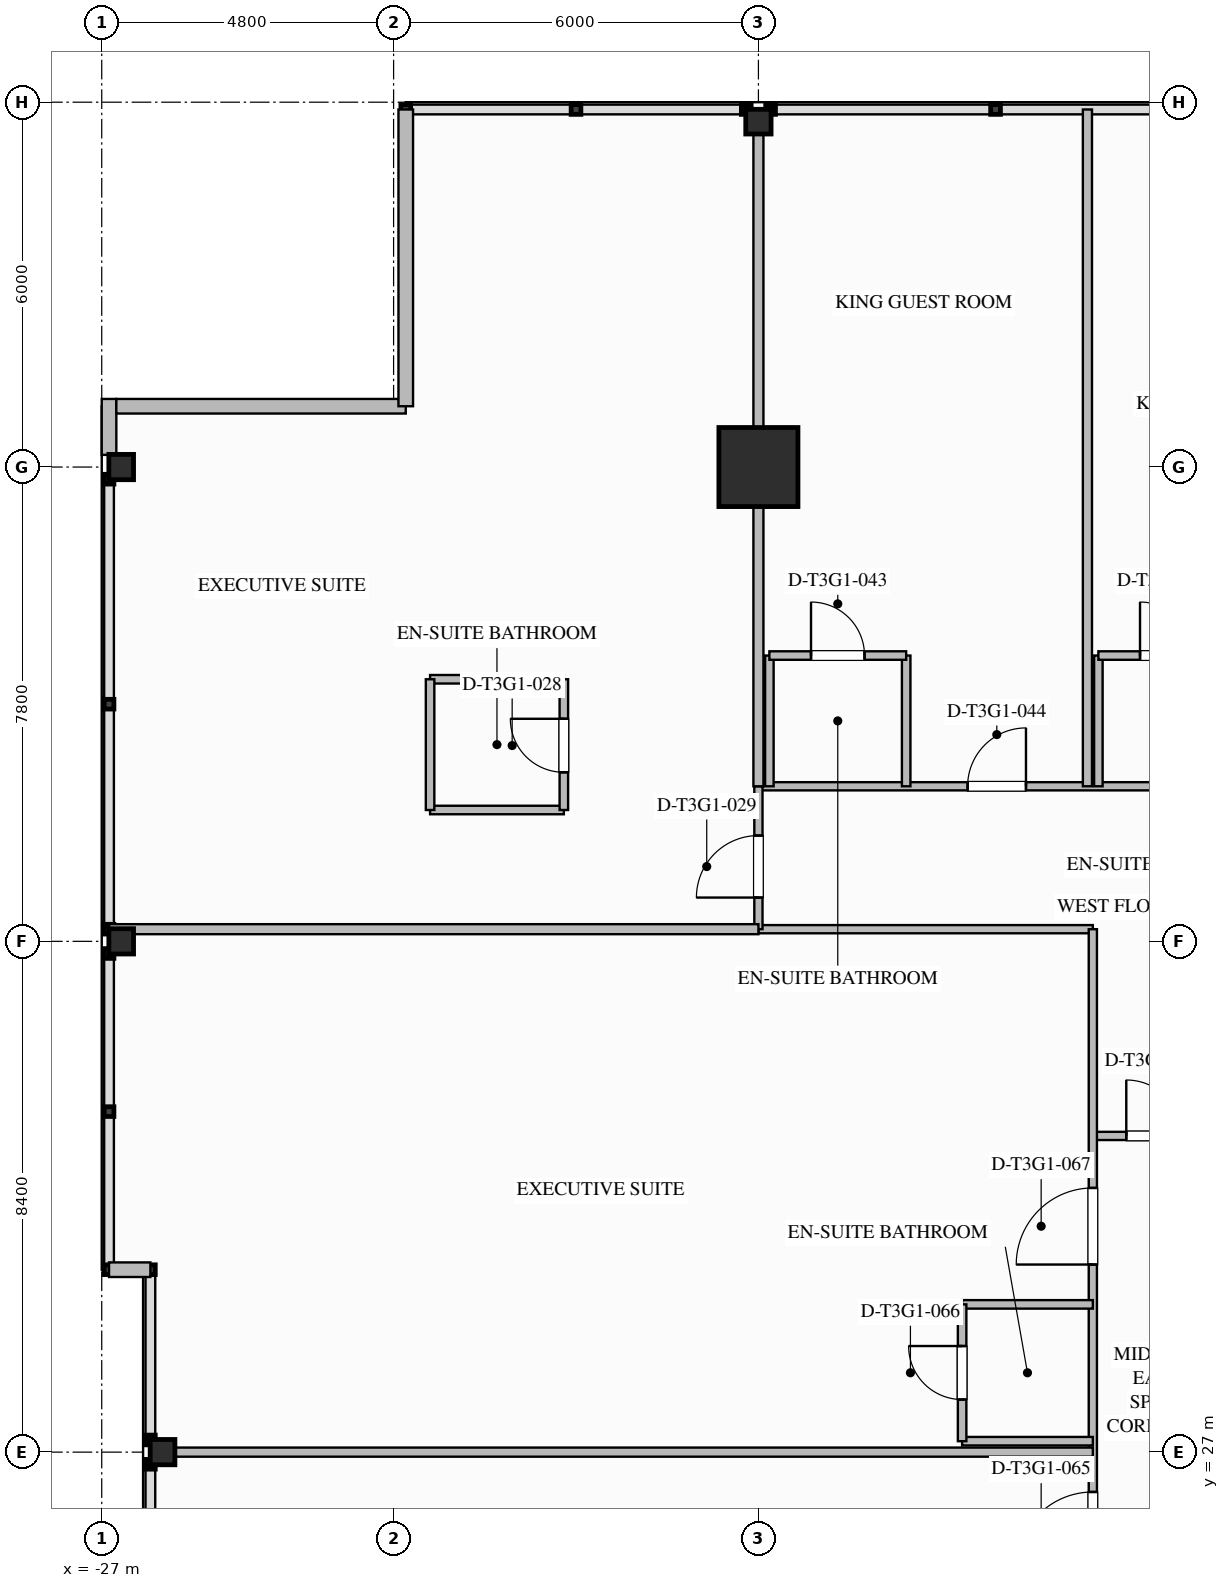
"""IFC4 building model, lengths in metres.
Left out: names, types, materials, properties, quantities, classifications, styles, units other than length and angle.
Written with IfcOpenShell. Run it as: python <this file> out.ifc"""

import sys

from ifc_helpers import new_model, si_unit, direction, frame, frame_2d, origin, origin_2d, place, context, subcontext, project, spatial, rectangle, i_section, extrude, element, fill, save


model = new_model("IFC4")
c1 = context("Model", 3, precision=1e-05, world=origin(), true_north=direction((0.0, 1.0)))
c2 = subcontext(c1, "Body", "Model", "MODEL_VIEW")
j1 = project(units=[si_unit("LENGTHUNIT", "METRE"), si_unit("PLANEANGLEUNIT", "RADIAN")], contexts=[c1])
p1 = place(None, origin())
s1 = spatial("IfcSite", under=j1, at=p1, CompositionType="ELEMENT")
p2 = place(p1, origin())
s2 = spatial("IfcBuilding", under=s1, at=p2, CompositionType="ELEMENT")
p3 = place(p2, frame((0.0, 0.0, 150.4)))
s3 = spatial("IfcBuildingStorey", under=s2, at=p3, CompositionType="ELEMENT", Elevation=150.4)
p4 = place(p3, frame((-16.2, 43.2, 0.0), z_axis=(0.0, 0.0, 1.0), x_axis=(1.0, 0.0, 0.0)))
e1 = element("IfcColumn", 1, at=p4, inside=s3, PredefinedType="COLUMN", context=c2, shape_type="SweptSolid", body=[
    extrude(rectangle(XDim=1.3, YDim=1.3, at=origin_2d()), origin(), (0.0, 0.0, 1.0), 3.55),
])
for number, where, z_axis, x_axis in (
    (2, (-26.0, 27.0, 0.0), (0.0, 0.0, 1.0), (1.0, 0.0, 0.0)),
    (3, (-26.68, 35.4, 0.0), (0.0, 0.0, 1.0), (1.0, 0.0, 0.0)),
    (4, (-26.68, 43.2, 0.0), (0.0, 0.0, 1.0), (1.0, 0.0, 0.0)),
    (5, (-16.2, 48.88, 0.0), (0.0, 0.0, 1.0), (0.0, 1.0, 0.0)),
):
    element("IfcColumn", number, at=place(p3, frame(where, z_axis=z_axis, x_axis=x_axis)), inside=s3, PredefinedType="COLUMN", context=c2, shape_type="SweptSolid", body=[
        extrude(i_section(OverallWidth=0.406, OverallDepth=0.416, WebThickness=0.03, FlangeThickness=0.048, FilletRadius=0.028, at=origin_2d()), origin(), (0.0, 0.0, 1.0), 3.547),
    ])
p5 = place(p3, frame((-26.88, 43.4, 0.0), z_axis=(0.0, 0.0, 1.0), x_axis=(0.0, 1.0, 0.0)))
e6 = element("IfcWall", 6, at=p5, inside=s3, PredefinedType="STANDARD", context=c2, shape_type="SweptSolid", body=[
    extrude(rectangle(XDim=0.92, YDim=0.24, at=frame_2d((0.46, 0.0))), origin(), (0.0, 0.0, 1.0), 3.29),
])
p6 = place(p3, frame((-26.76, 44.2, 0.0), z_axis=(0.0, 0.0, 1.0), x_axis=(1.0, 0.0, 0.0)))
e7 = element("IfcWall", 7, at=p6, inside=s3, PredefinedType="STANDARD", context=c2, shape_type="SweptSolid", body=[
    extrude(rectangle(XDim=4.76, YDim=0.24, at=frame_2d((2.38, 0.0))), origin(), (0.0, 0.0, 1.0), 3.29),
])
p7 = place(p3, frame((-22.0, 44.2, 0.0), z_axis=(0.0, 0.0, 1.0), x_axis=(0.0, 1.0, 0.0)))
e8 = element("IfcWall", 8, at=p7, inside=s3, PredefinedType="STANDARD", context=c2, shape_type="SweptSolid", body=[
    extrude(rectangle(XDim=4.88, YDim=0.24, at=frame_2d((2.44, 0.0))), origin(), (0.0, 0.0, 1.0), 3.29),
])
p8 = place(p3, frame((-26.2, 30.0, 0.0), z_axis=(0.0, 0.0, 1.0), x_axis=(-1.0, 0.0, 0.0)))
e9 = element("IfcWall", 9, at=p8, inside=s3, PredefinedType="STANDARD", context=c2, shape_type="SweptSolid", body=[
    extrude(rectangle(XDim=0.68, YDim=0.24, at=frame_2d((0.34, 0.0))), origin(), (0.0, 0.0, 1.0), 3.29),
])
p9 = place(p3, frame((-10.7, 32.2, 0.0), z_axis=(0.0, 0.0, 1.0), x_axis=(1.0, 0.0, 0.0)))
e10 = element("IfcWall", 10, at=p9, inside=s3, PredefinedType="PARTITIONING", context=c2, shape_type="SweptSolid", body=[
    extrude(rectangle(XDim=2.1, YDim=0.135, at=frame_2d((1.05, 0.0))), origin(), (0.0, 0.0, 1.0), 3.29),
])
p10 = place(p9, frame((0.55, 0.0, 0.0)))
e11 = element("IfcOpeningElement", 11, at=p10, cuts=e10, PredefinedType="OPENING", context=c2, shape_type="SweptSolid", body=[
    extrude(rectangle(XDim=0.92, YDim=2.1, at=frame_2d((0.46, 1.05))), frame((0.0, 0.077, 0.0), z_axis=(0.0, -1.0, 0.0), x_axis=(1.0, 0.0, 0.0)), (0.0, 0.0, 1.0), 0.155),
])
p11 = place(p3, frame((-16.2, 35.6, 0.0), z_axis=(0.0, 0.0, 1.0), x_axis=(1.0, 0.0, 0.0)))
e12 = element("IfcWall", 12, at=p11, inside=s3, PredefinedType="PARTITIONING", context=c2, shape_type="SweptSolid", body=[
    extrude(rectangle(XDim=5.5, YDim=0.135, at=frame_2d((2.75, 0.0))), origin(), (0.0, 0.0, 1.0), 2.667),
])
p12 = place(p3, frame((-16.2, 37.95, 0.0), z_axis=(0.0, 0.0, 1.0), x_axis=(1.0, 0.0, 0.0)))
e13 = element("IfcWall", 13, at=p12, inside=s3, PredefinedType="PARTITIONING", context=c2, shape_type="SweptSolid", body=[
    extrude(rectangle(XDim=24.8, YDim=0.135, at=frame_2d((12.4, 0.0))), origin(), (0.0, 0.0, 1.0), 3.29),
])
p13 = place(p12, frame((3.44, 0.0, 0.0)))
e14 = element("IfcOpeningElement", 14, at=p13, cuts=e13, PredefinedType="OPENING", context=c2, shape_type="SweptSolid", body=[
    extrude(rectangle(XDim=0.96, YDim=2.15, at=frame_2d((0.48, 1.075))), frame((0.0, 0.077, 0.0), z_axis=(0.0, -1.0, 0.0), x_axis=(1.0, 0.0, 0.0)), (0.0, 0.0, 1.0), 0.155),
])
p14 = place(p12, frame((8.4, 0.0, 0.0)))
e15 = element("IfcOpeningElement", 15, at=p14, cuts=e13, PredefinedType="OPENING", context=c2, shape_type="SweptSolid", body=[
    extrude(rectangle(XDim=0.96, YDim=2.15, at=frame_2d((0.48, 1.075))), frame((0.0, 0.077, 0.0), z_axis=(0.0, -1.0, 0.0), x_axis=(1.0, 0.0, 0.0)), (0.0, 0.0, 1.0), 0.155),
])
p15 = place(p12, frame((13.135, 0.0, 0.0)))
e16 = element("IfcOpeningElement", 16, at=p15, cuts=e13, PredefinedType="OPENING", context=c2, shape_type="SweptSolid", body=[
    extrude(rectangle(XDim=0.96, YDim=2.15, at=frame_2d((0.48, 1.075))), frame((0.0, 0.077, 0.0), z_axis=(0.0, -1.0, 0.0), x_axis=(1.0, 0.0, 0.0)), (0.0, 0.0, 1.0), 0.155),
])
p16 = place(p12, frame((17.565, 0.0, 0.0)))
e17 = element("IfcOpeningElement", 17, at=p16, cuts=e13, PredefinedType="OPENING", context=c2, shape_type="SweptSolid", body=[
    extrude(rectangle(XDim=0.96, YDim=2.15, at=frame_2d((0.48, 1.075))), frame((0.0, 0.077, 0.0), z_axis=(0.0, -1.0, 0.0), x_axis=(1.0, 0.0, 0.0)), (0.0, 0.0, 1.0), 0.155),
])
p17 = place(p12, frame((22.525, 0.0, 0.0)))
e18 = element("IfcOpeningElement", 18, at=p17, cuts=e13, PredefinedType="OPENING", context=c2, shape_type="SweptSolid", body=[
    extrude(rectangle(XDim=0.96, YDim=2.15, at=frame_2d((0.48, 1.075))), frame((0.0, 0.077, 0.0), z_axis=(0.0, -1.0, 0.0), x_axis=(1.0, 0.0, 0.0)), (0.0, 0.0, 1.0), 0.155),
])
p18 = place(p3, frame((-10.7, 18.4, 0.0), z_axis=(0.0, 0.0, 1.0), x_axis=(0.0, 1.0, 0.0)))
e19 = element("IfcWall", 19, at=p18, inside=s3, PredefinedType="PARTITIONING", context=c2, shape_type="SweptSolid", body=[
    extrude(rectangle(XDim=17.2, YDim=0.135, at=frame_2d((8.6, 0.0))), origin(), (0.0, 0.0, 1.0), 3.29),
])
p19 = place(p18, frame((6.685, 0.0, 0.0)))
e20 = element("IfcOpeningElement", 20, at=p19, cuts=e19, PredefinedType="OPENING", context=c2, shape_type="SweptSolid", body=[
    extrude(rectangle(XDim=1.26, YDim=2.2, at=frame_2d((0.63, 1.1))), frame((0.0, 0.077, 0.0), z_axis=(0.0, -1.0, 0.0), x_axis=(1.0, 0.0, 0.0)), (0.0, 0.0, 1.0), 0.155),
])
p20 = place(p18, frame((11.685, 0.0, 0.0)))
e21 = element("IfcOpeningElement", 21, at=p20, cuts=e19, PredefinedType="OPENING", context=c2, shape_type="SweptSolid", body=[
    extrude(rectangle(XDim=1.26, YDim=2.2, at=frame_2d((0.63, 1.1))), frame((0.0, 0.077, 0.0), z_axis=(0.0, -1.0, 0.0), x_axis=(1.0, 0.0, 0.0)), (0.0, 0.0, 1.0), 0.155),
])
p21 = place(p3, frame((-16.2, 35.6, 0.0), z_axis=(0.0, 0.0, 1.0), x_axis=(0.0, 1.0, 0.0)))
e22 = element("IfcWall", 22, at=p21, inside=s3, PredefinedType="PARTITIONING", context=c2, shape_type="SweptSolid", body=[
    extrude(rectangle(XDim=2.35, YDim=0.135, at=frame_2d((1.175, 0.0))), origin(), (0.0, 0.0, 1.0), 2.58),
])
p22 = place(p21, frame((0.52, 0.0, 0.0)))
e23 = element("IfcOpeningElement", 23, at=p22, cuts=e22, PredefinedType="OPENING", context=c2, shape_type="SweptSolid", body=[
    extrude(rectangle(XDim=1.02, YDim=2.15, at=frame_2d((0.51, 1.075))), frame((0.0, 0.077, 0.0), z_axis=(0.0, -1.0, 0.0), x_axis=(1.0, 0.0, 0.0)), (0.0, 0.0, 1.0), 0.155),
])
p23 = place(p3, frame((-16.2, 37.95, 0.0), z_axis=(0.0, 0.0, 1.0), x_axis=(0.0, 1.0, 0.0)))
e24 = element("IfcWall", 24, at=p23, inside=s3, PredefinedType="PARTITIONING", context=c2, shape_type="SweptSolid", body=[
    extrude(rectangle(XDim=11.13, YDim=0.165, at=frame_2d((5.565, 0.0))), origin(), (0.0, 0.0, 1.0), 2.58),
])
p24 = place(p3, frame((-26.88, 35.6, 0.0), z_axis=(0.0, 0.0, 1.0), x_axis=(1.0, 0.0, 0.0)))
e25 = element("IfcWall", 25, at=p24, inside=s3, PredefinedType="PARTITIONING", context=c2, shape_type="SweptSolid", body=[
    extrude(rectangle(XDim=10.68, YDim=0.165, at=frame_2d((5.34, 0.0))), origin(), (0.0, 0.0, 1.0), 2.58),
])
for number, where, z_axis, x_axis in (
    (26, (-21.6, 37.56, 0.0), (0.0, 0.0, 1.0), (1.0, 0.0, 0.0)),
    (27, (-21.6, 39.71, 0.0), (0.0, 0.0, 1.0), (1.0, 0.0, 0.0)),
):
    element("IfcWall", number, at=place(p3, frame(where, z_axis=z_axis, x_axis=x_axis)), inside=s3, PredefinedType="PLUMBINGWALL", context=c2, shape_type="SweptSolid", body=[
        extrude(rectangle(XDim=2.2, YDim=0.14, at=frame_2d((1.1, 0.0))), origin(), (0.0, 0.0, 1.0), 3.29),
    ])
p25 = place(p3, frame((-21.6, 37.56, 0.0), z_axis=(0.0, 0.0, 1.0), x_axis=(0.0, 1.0, 0.0)))
e28 = element("IfcWall", 28, at=p25, inside=s3, PredefinedType="PLUMBINGWALL", context=c2, shape_type="SweptSolid", body=[
    extrude(rectangle(XDim=2.15, YDim=0.14, at=frame_2d((1.075, 0.0))), origin(), (0.0, 0.0, 1.0), 3.29),
])
p26 = place(p3, frame((-19.4, 37.56, 0.0), z_axis=(0.0, 0.0, 1.0), x_axis=(0.0, 1.0, 0.0)))
e29 = element("IfcWall", 29, at=p26, inside=s3, PredefinedType="PLUMBINGWALL", context=c2, shape_type="SweptSolid", body=[
    extrude(rectangle(XDim=2.15, YDim=0.14, at=frame_2d((1.075, 0.0))), origin(), (0.0, 0.0, 1.0), 3.29),
])
p27 = place(p26, frame((0.62, 0.0, 0.0)))
e30 = element("IfcOpeningElement", 30, at=p27, cuts=e29, PredefinedType="OPENING", context=c2, shape_type="SweptSolid", body=[
    extrude(rectangle(XDim=0.88, YDim=2.1, at=frame_2d((0.44, 1.05))), frame((0.0, 0.08, 0.0), z_axis=(0.0, -1.0, 0.0), x_axis=(1.0, 0.0, 0.0)), (0.0, 0.0, 1.0), 0.16),
])
p28 = place(p3, frame((-16.02, 37.95, 0.0), z_axis=(0.0, 0.0, 1.0), x_axis=(0.0, 1.0, 0.0)))
e31 = element("IfcWall", 31, at=p28, inside=s3, PredefinedType="PLUMBINGWALL", context=c2, shape_type="SweptSolid", body=[
    extrude(rectangle(XDim=2.15, YDim=0.14, at=frame_2d((1.075, 0.0))), origin(), (0.0, 0.0, 1.0), 2.58),
])
p29 = place(p3, frame((-13.77, 37.95, 0.0), z_axis=(0.0, 0.0, 1.0), x_axis=(0.0, 1.0, 0.0)))
e32 = element("IfcWall", 32, at=p29, inside=s3, PredefinedType="PLUMBINGWALL", context=c2, shape_type="SweptSolid", body=[
    extrude(rectangle(XDim=2.15, YDim=0.14, at=frame_2d((1.075, 0.0))), origin(), (0.0, 0.0, 1.0), 3.29),
])
p30 = place(p3, frame((-16.02, 40.1, 0.0), z_axis=(0.0, 0.0, 1.0), x_axis=(1.0, 0.0, 0.0)))
e33 = element("IfcWall", 33, at=p30, inside=s3, PredefinedType="PLUMBINGWALL", context=c2, shape_type="SweptSolid", body=[
    extrude(rectangle(XDim=2.25, YDim=0.14, at=frame_2d((1.125, 0.0))), origin(), (0.0, 0.0, 1.0), 3.29),
])
p31 = place(p30, frame((0.685, 0.0, 0.0)))
e34 = element("IfcOpeningElement", 34, at=p31, cuts=e33, PredefinedType="OPENING", context=c2, shape_type="SweptSolid", body=[
    extrude(rectangle(XDim=0.88, YDim=2.1, at=frame_2d((0.44, 1.05))), frame((0.0, 0.08, 0.0), z_axis=(0.0, -1.0, 0.0), x_axis=(1.0, 0.0, 0.0)), (0.0, 0.0, 1.0), 0.16),
])
p32 = place(p3, frame((-10.789, 37.95, 0.0), z_axis=(0.0, 0.0, 1.0), x_axis=(0.0, 1.0, 0.0)))
e35 = element("IfcWall", 35, at=p32, inside=s3, PredefinedType="PARTITIONING", context=c2, shape_type="SweptSolid", body=[
    extrude(rectangle(XDim=11.13, YDim=0.15, at=frame_2d((5.565, 0.0))), origin(), (0.0, 0.0, 1.0), 3.29),
])
p33 = place(p3, frame((-10.609, 37.95, 0.0), z_axis=(0.0, 0.0, 1.0), x_axis=(0.0, 1.0, 0.0)))
e36 = element("IfcWall", 36, at=p33, inside=s3, PredefinedType="PLUMBINGWALL", context=c2, shape_type="SweptSolid", body=[
    extrude(rectangle(XDim=2.15, YDim=0.14, at=frame_2d((1.075, 0.0))), origin(), (0.0, 0.0, 1.0), 3.29),
])
p34 = place(p3, frame((-10.609, 40.1, 0.0), z_axis=(0.0, 0.0, 1.0), x_axis=(1.0, 0.0, 0.0)))
e37 = element("IfcWall", 37, at=p34, inside=s3, PredefinedType="PLUMBINGWALL", context=c2, shape_type="SweptSolid", body=[
    extrude(rectangle(XDim=2.25, YDim=0.14, at=frame_2d((1.125, 0.0))), origin(), (0.0, 0.0, 1.0), 3.29),
])
p35 = place(p34, frame((0.685, 0.0, 0.0)))
e38 = element("IfcOpeningElement", 38, at=p35, cuts=e37, PredefinedType="OPENING", context=c2, shape_type="SweptSolid", body=[
    extrude(rectangle(XDim=0.88, YDim=2.1, at=frame_2d((0.44, 1.05))), frame((0.0, 0.08, 0.0), z_axis=(0.0, -1.0, 0.0), x_axis=(1.0, 0.0, 0.0)), (0.0, 0.0, 1.0), 0.16),
])
p36 = place(p3, frame((-26.2, 27.0, 0.0), z_axis=(0.0, 0.0, 1.0), x_axis=(1.0, 0.0, 0.0)))
e39 = element("IfcWall", 39, at=p36, inside=s3, PredefinedType="PARTITIONING", context=c2, shape_type="SweptSolid", body=[
    extrude(rectangle(XDim=15.5, YDim=0.15, at=frame_2d((7.75, 0.0))), origin(), (0.0, 0.0, 1.0), 2.58),
])
p37 = place(p3, frame((-10.7, 27.18, 0.0), z_axis=(0.0, 0.0, 1.0), x_axis=(-1.0, 0.0, 0.0)))
e40 = element("IfcWall", 40, at=p37, inside=s3, PredefinedType="PLUMBINGWALL", context=c2, shape_type="SweptSolid", body=[
    extrude(rectangle(XDim=2.15, YDim=0.14, at=frame_2d((1.075, 0.0))), origin(), (0.0, 0.0, 1.0), 2.667),
])
p38 = place(p3, frame((-10.7, 29.43, 0.0), z_axis=(0.0, 0.0, 1.0), x_axis=(-1.0, 0.0, 0.0)))
e41 = element("IfcWall", 41, at=p38, inside=s3, PredefinedType="PLUMBINGWALL", context=c2, shape_type="SweptSolid", body=[
    extrude(rectangle(XDim=2.15, YDim=0.14, at=frame_2d((1.075, 0.0))), origin(), (0.0, 0.0, 1.0), 3.29),
])
p39 = place(p3, frame((-12.85, 27.18, 0.0), z_axis=(0.0, 0.0, 1.0), x_axis=(0.0, 1.0, 0.0)))
e42 = element("IfcWall", 42, at=p39, inside=s3, PredefinedType="PLUMBINGWALL", context=c2, shape_type="SweptSolid", body=[
    extrude(rectangle(XDim=2.25, YDim=0.14, at=frame_2d((1.125, 0.0))), origin(), (0.0, 0.0, 1.0), 3.29),
])
p40 = place(p39, frame((0.685, 0.0, 0.0)))
e43 = element("IfcOpeningElement", 43, at=p40, cuts=e42, PredefinedType="OPENING", context=c2, shape_type="SweptSolid", body=[
    extrude(rectangle(XDim=0.88, YDim=2.1, at=frame_2d((0.44, 1.05))), frame((0.0, 0.08, 0.0), z_axis=(0.0, -1.0, 0.0), x_axis=(1.0, 0.0, 0.0)), (0.0, 0.0, 1.0), 0.16),
])
p41 = place(p10, origin())
e44 = element("IfcDoor", 44, at=p41, inside=s3, OperationType="SINGLE_SWING_LEFT", PredefinedType="DOOR", context=c2, shape_type="SweptSolid", body=[
    extrude(rectangle(XDim=0.92, YDim=2.1, at=frame_2d((0.46, 1.05))), frame((0.0, 0.025, 0.0), z_axis=(0.0, -1.0, 0.0), x_axis=(1.0, 0.0, 0.0)), (0.0, 0.0, 1.0), 0.05),
])
fill(e11, e44)
p42 = place(p27, origin())
e45 = element("IfcDoor", 45, at=p42, inside=s3, OperationType="SINGLE_SWING_RIGHT", PredefinedType="DOOR", context=c2, shape_type="SweptSolid", body=[
    extrude(rectangle(XDim=0.88, YDim=2.1, at=frame_2d((0.44, 1.05))), frame((0.0, 0.025, 0.0), z_axis=(0.0, -1.0, 0.0), x_axis=(1.0, 0.0, 0.0)), (0.0, 0.0, 1.0), 0.05),
])
fill(e30, e45)
p43 = place(p22, origin())
e46 = element("IfcDoor", 46, at=p43, inside=s3, OperationType="SINGLE_SWING_LEFT", PredefinedType="DOOR", context=c2, shape_type="SweptSolid", body=[
    extrude(rectangle(XDim=1.02, YDim=2.15, at=frame_2d((0.51, 1.075))), frame((0.0, 0.025, 0.0), z_axis=(0.0, -1.0, 0.0), x_axis=(1.0, 0.0, 0.0)), (0.0, 0.0, 1.0), 0.05),
])
fill(e23, e46)
p44 = place(p31, origin())
e47 = element("IfcDoor", 47, at=p44, inside=s3, OperationType="SINGLE_SWING_LEFT", PredefinedType="DOOR", context=c2, shape_type="SweptSolid", body=[
    extrude(rectangle(XDim=0.88, YDim=2.1, at=frame_2d((0.44, 1.05))), frame((0.0, 0.025, 0.0), z_axis=(0.0, -1.0, 0.0), x_axis=(1.0, 0.0, 0.0)), (0.0, 0.0, 1.0), 0.05),
])
fill(e34, e47)
p45 = place(p13, origin())
e48 = element("IfcDoor", 48, at=p45, inside=s3, OperationType="SINGLE_SWING_RIGHT", PredefinedType="DOOR", context=c2, shape_type="SweptSolid", body=[
    extrude(rectangle(XDim=0.96, YDim=2.15, at=frame_2d((0.48, 1.075))), frame((0.0, 0.025, 0.0), z_axis=(0.0, -1.0, 0.0), x_axis=(1.0, 0.0, 0.0)), (0.0, 0.0, 1.0), 0.05),
])
fill(e14, e48)
p46 = place(p35, origin())
e49 = element("IfcDoor", 49, at=p46, inside=s3, OperationType="SINGLE_SWING_LEFT", PredefinedType="DOOR", context=c2, shape_type="SweptSolid", body=[
    extrude(rectangle(XDim=0.88, YDim=2.1, at=frame_2d((0.44, 1.05))), frame((0.0, 0.025, 0.0), z_axis=(0.0, -1.0, 0.0), x_axis=(1.0, 0.0, 0.0)), (0.0, 0.0, 1.0), 0.05),
])
fill(e38, e49)
p47 = place(p19, origin())
e50 = element("IfcDoor", 50, at=p47, inside=s3, OperationType="SINGLE_SWING_LEFT", PredefinedType="DOOR", context=c2, shape_type="SweptSolid", body=[
    extrude(rectangle(XDim=1.26, YDim=2.2, at=frame_2d((0.63, 1.1))), frame((0.0, 0.025, 0.0), z_axis=(0.0, -1.0, 0.0), x_axis=(1.0, 0.0, 0.0)), (0.0, 0.0, 1.0), 0.05),
])
fill(e20, e50)
p48 = place(p40, origin())
e51 = element("IfcDoor", 51, at=p48, inside=s3, OperationType="SINGLE_SWING_RIGHT", PredefinedType="DOOR", context=c2, shape_type="SweptSolid", body=[
    extrude(rectangle(XDim=0.88, YDim=2.1, at=frame_2d((0.44, 1.05))), frame((0.0, 0.025, 0.0), z_axis=(0.0, -1.0, 0.0), x_axis=(1.0, 0.0, 0.0)), (0.0, 0.0, 1.0), 0.05),
])
fill(e43, e51)
p49 = place(p20, origin())
e52 = element("IfcDoor", 52, at=p49, inside=s3, OperationType="SINGLE_SWING_LEFT", PredefinedType="DOOR", context=c2, shape_type="SweptSolid", body=[
    extrude(rectangle(XDim=1.26, YDim=2.2, at=frame_2d((0.63, 1.1))), frame((0.0, 0.025, 0.0), z_axis=(0.0, -1.0, 0.0), x_axis=(1.0, 0.0, 0.0)), (0.0, 0.0, 1.0), 0.05),
])
fill(e21, e52)
save(model, sys.argv[1])
